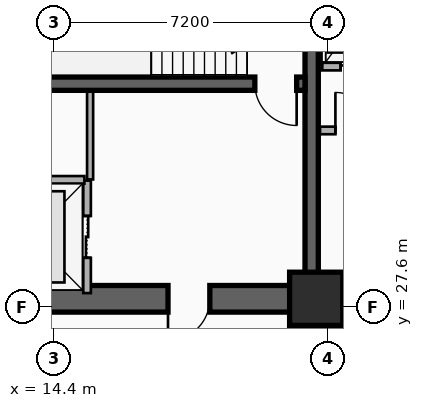
"""IFC4 building model, lengths in metres.
Left out: names, types, materials, properties, quantities, classifications, styles, units other than length and angle.
Written with IfcOpenShell. Run it as: python <this file> out.ifc"""

import sys

from ifc_helpers import new_model, si_unit, direction, frame, frame_2d, origin, origin_2d, place, context, subcontext, project, spatial, rectangle, extrude, element, fill, save


model = new_model("IFC4")
c1 = context("Model", 3, precision=1e-05, world=origin(), true_north=direction((0.0, 1.0)))
c2 = subcontext(c1, "Body", "Model", "MODEL_VIEW")
j1 = project(units=[si_unit("LENGTHUNIT", "METRE"), si_unit("PLANEANGLEUNIT", "RADIAN")], contexts=[c1])
p1 = place(None, origin())
s1 = spatial("IfcSite", under=j1, at=p1, CompositionType="ELEMENT")
p2 = place(p1, origin())
s2 = spatial("IfcBuilding", under=s1, at=p2, CompositionType="ELEMENT")
p3 = place(p2, frame((0.0, 0.0, 53.5)))
s3 = spatial("IfcBuildingStorey", under=s2, at=p3, CompositionType="ELEMENT", Elevation=53.5)
p4 = place(p3, frame((21.18, 27.82, 0.0), z_axis=(0.0, 0.0, 1.0), x_axis=(-1.0, 0.0, 0.0)))
e1 = element("IfcWall", 1, at=p4, inside=s3, PredefinedType="SHEAR", context=c2, shape_type="SweptSolid", body=[
    extrude(rectangle(XDim=9.03, YDim=0.7, at=frame_2d((4.515, 0.0))), origin(), (0.0, 0.0, 1.0), 3.5),
])
p5 = place(p4, frame((2.68, 0.0, 0.0)))
e2 = element("IfcOpeningElement", 2, at=p5, cuts=e1, PredefinedType="OPENING", context=c2, shape_type="SweptSolid", body=[
    extrude(rectangle(XDim=1.1, YDim=2.15, at=frame_2d((0.55, 1.075))), frame((0.0, 0.36, 0.0), z_axis=(0.0, -1.0, 0.0), x_axis=(1.0, 0.0, 0.0)), (0.0, 0.0, 1.0), 0.72),
])
p6 = place(p3, frame((33.15, 27.82, 0.0), z_axis=(0.0, 0.0, 1.0), x_axis=(-1.0, 0.0, 0.0)))
e3 = element("IfcWall", 3, at=p6, inside=s3, PredefinedType="SHEAR", context=c2, shape_type="SweptSolid", body=[
    extrude(rectangle(XDim=11.97, YDim=0.7, at=frame_2d((5.985, 0.0))), origin(), (0.0, 0.0, 1.0), 3.5),
])
p7 = place(p6, frame((6.1, 0.0, 0.0)))
e4 = element("IfcOpeningElement", 4, at=p7, cuts=e3, PredefinedType="OPENING", context=c2, shape_type="SweptSolid", body=[
    extrude(rectangle(XDim=1.6, YDim=2.2, at=frame_2d((0.8, 1.1))), frame((0.0, 0.36, 0.0), z_axis=(0.0, -1.0, 0.0), x_axis=(1.0, 0.0, 0.0)), (0.0, 0.0, 1.0), 0.72),
])
p8 = place(p3, frame((21.18, 28.17, 0.0), z_axis=(0.0, 0.0, 1.0), x_axis=(0.0, 1.0, 0.0)))
e5 = element("IfcWall", 5, at=p8, inside=s3, PredefinedType="SHEAR", context=c2, shape_type="SweptSolid", body=[
    extrude(rectangle(XDim=8.53, YDim=0.35, at=frame_2d((4.265, 0.0))), origin(), (0.0, 0.0, 1.0), 3.5),
])
p9 = place(p3, frame((21.005, 33.48, 0.0), z_axis=(0.0, 0.0, 1.0), x_axis=(-1.0, 0.0, 0.0)))
e6 = element("IfcWall", 6, at=p9, inside=s3, PredefinedType="SHEAR", context=c2, shape_type="SweptSolid", body=[
    extrude(rectangle(XDim=8.505, YDim=0.35, at=frame_2d((4.252, 0.0))), origin(), (0.0, 0.0, 1.0), 3.5),
])
p10 = place(p9, frame((0.22, 0.0, 0.0)))
e7 = element("IfcOpeningElement", 7, at=p10, cuts=e6, PredefinedType="OPENING", context=c2, shape_type="SweptSolid", body=[
    extrude(rectangle(XDim=1.1, YDim=2.15, at=frame_2d((0.55, 1.075))), frame((0.0, 0.185, 0.0), z_axis=(0.0, -1.0, 0.0), x_axis=(1.0, 0.0, 0.0)), (0.0, 0.0, 1.0), 0.37),
])
p11 = place(p3, frame((21.3, 27.82, 0.0), z_axis=(0.0, 0.0, 1.0), x_axis=(1.0, 0.0, 0.0)))
e8 = element("IfcColumn", 8, at=p11, inside=s3, PredefinedType="COLUMN", context=c2, shape_type="SweptSolid", body=[
    extrude(rectangle(XDim=1.4, YDim=1.4, at=origin_2d()), origin(), (0.0, 0.0, 1.0), 3.5),
])
p12 = place(p3, frame((15.27, 27.97, 0.0), z_axis=(0.0, 0.0, 1.0), x_axis=(0.0, 1.0, 0.0)))
e9 = element("IfcWall", 9, at=p12, inside=s3, PredefinedType="PARTITIONING", context=c2, shape_type="SweptSolid", body=[
    extrude(rectangle(XDim=2.96, YDim=0.2, at=frame_2d((1.48, 0.0))), origin(), (0.0, 0.0, 1.0), 2.212),
])
p13 = place(p12, frame((0.93, 0.0, 0.0)))
e10 = element("IfcOpeningElement", 10, at=p13, cuts=e9, PredefinedType="OPENING", context=c2, shape_type="SweptSolid", body=[
    extrude(rectangle(XDim=1.1, YDim=2.15, at=frame_2d((0.55, 1.075))), frame((0.0, 0.11, 0.0), z_axis=(0.0, -1.0, 0.0), x_axis=(1.0, 0.0, 0.0)), (0.0, 0.0, 1.0), 0.22),
])
p14 = place(p3, frame((12.45, 30.95, 0.0), z_axis=(0.0, 0.0, 1.0), x_axis=(1.0, 0.0, 0.0)))
e11 = element("IfcWall", 11, at=p14, inside=s3, PredefinedType="PARTITIONING", context=c2, shape_type="SweptSolid", body=[
    extrude(rectangle(XDim=2.75, YDim=0.2, at=frame_2d((1.375, 0.0))), origin(), (0.0, 0.0, 1.0), 2.212),
])
p15 = place(p3, frame((21.46, 33.93, 0.0), z_axis=(0.0, 0.0, 1.0), x_axis=(1.0, 0.0, 0.0)))
e12 = element("IfcWall", 12, at=p15, inside=s3, PredefinedType="PARTITIONING", context=c2, shape_type="SweptSolid", body=[
    extrude(rectangle(XDim=2.065, YDim=0.2, at=frame_2d((1.032, 0.0))), origin(), (0.0, 0.0, 1.0), 2.212),
])
p16 = place(p15, frame((0.482, 0.0, 0.0)))
e13 = element("IfcOpeningElement", 13, at=p16, cuts=e12, PredefinedType="OPENING", context=c2, shape_type="SweptSolid", body=[
    extrude(rectangle(XDim=1.1, YDim=2.15, at=frame_2d((0.55, 1.075))), frame((0.0, 0.11, 0.0), z_axis=(0.0, -1.0, 0.0), x_axis=(1.0, 0.0, 0.0)), (0.0, 0.0, 1.0), 0.22),
])
p17 = place(p3, frame((21.4, 32.25, 0.0), z_axis=(0.0, 0.0, 1.0), x_axis=(1.0, 0.0, 0.0)))
e14 = element("IfcWall", 14, at=p17, inside=s3, PredefinedType="PARTITIONING", context=c2, shape_type="SweptSolid", body=[
    extrude(rectangle(XDim=1.81, YDim=0.2, at=frame_2d((0.905, 0.0))), origin(), (0.0, 0.0, 1.0), 2.28),
])
p18 = place(p17, frame((0.405, 0.0, 0.0)))
e15 = element("IfcOpeningElement", 15, at=p18, cuts=e14, PredefinedType="OPENING", context=c2, shape_type="SweptSolid", body=[
    extrude(rectangle(XDim=1.0, YDim=2.15, at=frame_2d((0.5, 1.075))), frame((0.0, 0.11, 0.0), z_axis=(0.0, -1.0, 0.0), x_axis=(1.0, 0.0, 0.0)), (0.0, 0.0, 1.0), 0.22),
])
p19 = place(p3, frame((15.35, 30.96, 0.0), z_axis=(0.0, 0.0, 1.0), x_axis=(0.0, 1.0, 0.0)))
e16 = element("IfcWall", 16, at=p19, inside=s3, PredefinedType="PARTITIONING", context=c2, shape_type="SweptSolid", body=[
    extrude(rectangle(XDim=2.31, YDim=0.16, at=frame_2d((1.155, 0.0))), origin(), (0.0, 0.0, 1.0), 3.24),
])
p20 = place(p13, origin())
e17 = element("IfcDoor", 17, at=p20, inside=s3, OperationType="DOUBLE_DOOR_SLIDING", PredefinedType="DOOR", context=c2, shape_type="SweptSolid", body=[
    extrude(rectangle(XDim=1.1, YDim=2.15, at=frame_2d((0.55, 1.075))), frame((0.0, 0.025, 0.0), z_axis=(0.0, -1.0, 0.0), x_axis=(1.0, 0.0, 0.0)), (0.0, 0.0, 1.0), 0.05),
])
fill(e10, e17)
p21 = place(p16, origin())
e18 = element("IfcDoor", 18, at=p21, inside=s3, OperationType="DOUBLE_DOOR_SLIDING", PredefinedType="DOOR", context=c2, shape_type="SweptSolid", body=[
    extrude(rectangle(XDim=1.1, YDim=2.15, at=frame_2d((0.55, 1.075))), frame((0.0, 0.025, 0.0), z_axis=(0.0, -1.0, 0.0), x_axis=(1.0, 0.0, 0.0)), (0.0, 0.0, 1.0), 0.05),
])
fill(e13, e18)
p22 = place(p10, origin())
e19 = element("IfcDoor", 19, at=p22, inside=s3, OperationType="SINGLE_SWING_LEFT", PredefinedType="DOOR", context=c2, shape_type="SweptSolid", body=[
    extrude(rectangle(XDim=1.1, YDim=2.15, at=frame_2d((0.55, 1.075))), frame((0.0, 0.025, 0.0), z_axis=(0.0, -1.0, 0.0), x_axis=(1.0, 0.0, 0.0)), (0.0, 0.0, 1.0), 0.05),
])
fill(e7, e19)
p23 = place(p5, origin())
e20 = element("IfcDoor", 20, at=p23, inside=s3, OperationType="SINGLE_SWING_RIGHT", PredefinedType="DOOR", context=c2, shape_type="SweptSolid", body=[
    extrude(rectangle(XDim=1.1, YDim=2.15, at=frame_2d((0.55, 1.075))), frame((0.0, 0.025, 0.0), z_axis=(0.0, -1.0, 0.0), x_axis=(1.0, 0.0, 0.0)), (0.0, 0.0, 1.0), 0.05),
])
fill(e2, e20)
p24 = place(p18, origin())
e21 = element("IfcDoor", 21, at=p24, inside=s3, OperationType="SINGLE_SWING_LEFT", PredefinedType="DOOR", context=c2, shape_type="SweptSolid", body=[
    extrude(rectangle(XDim=1.0, YDim=2.15, at=frame_2d((0.5, 1.075))), frame((0.0, 0.025, 0.0), z_axis=(0.0, -1.0, 0.0), x_axis=(1.0, 0.0, 0.0)), (0.0, 0.0, 1.0), 0.05),
])
fill(e15, e21)
save(model, sys.argv[1])
